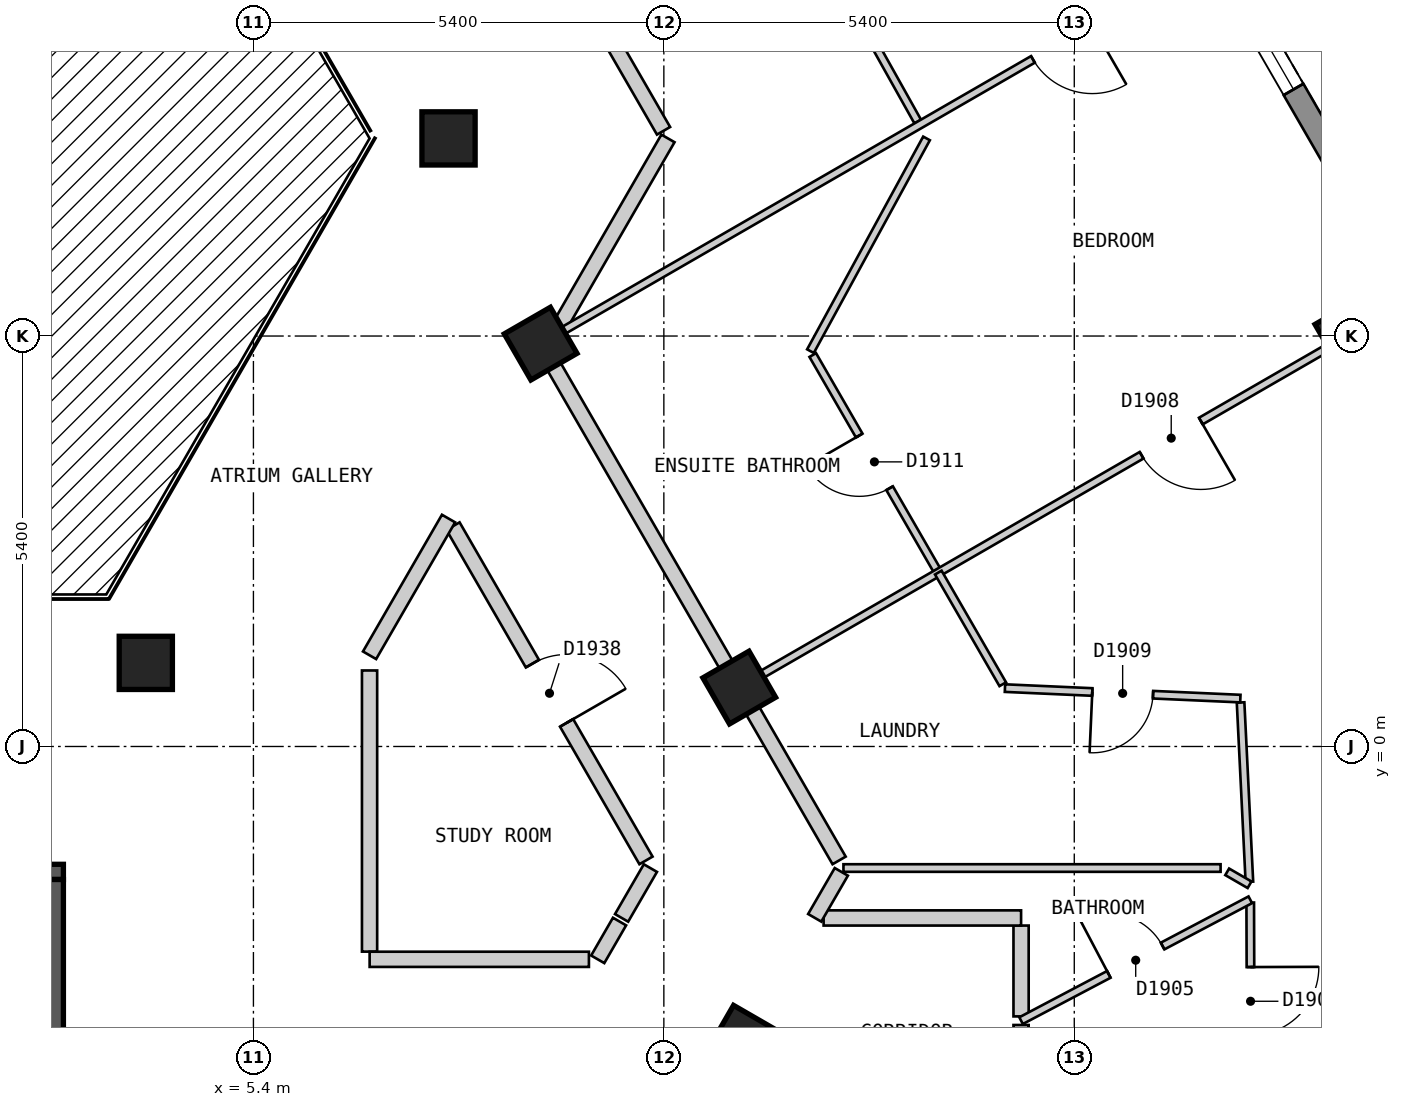
"""IFC4 building model, lengths in metres.
Left out: names, types, materials, properties, quantities, classifications, styles, units other than length and angle.
Written with IfcOpenShell. Run it as: python <this file> out.ifc"""

import sys

from ifc_helpers import new_model, si_unit, direction, frame, frame_2d, origin, origin_2d, place, context, subcontext, project, spatial, polyline, rectangle, outline, extrude, element, fill, save


model = new_model("IFC4")
c1 = context("Model", 3, precision=1e-05, world=origin(), true_north=direction((0.0, 1.0)))
c2 = subcontext(c1, "Body", "Model", "MODEL_VIEW")
j1 = project(units=[si_unit("LENGTHUNIT", "METRE"), si_unit("PLANEANGLEUNIT", "RADIAN")], contexts=[c1])
p1 = place(None, origin())
s1 = spatial("IfcSite", under=j1, at=p1, CompositionType="ELEMENT")
p2 = place(p1, origin())
s2 = spatial("IfcBuilding", under=s1, at=p2, CompositionType="ELEMENT")
p3 = place(p2, frame((0.0, 0.0, 226.8)))
s3 = spatial("IfcBuildingStorey", under=s2, at=p3, CompositionType="ELEMENT", Elevation=226.8)
for number, where, z_axis, x_axis in (
    (1, (19.846, 5.425, 0.0), (0.0, 0.0, 1.0), (-0.5, 0.866, 0.0)),
    (2, (11.845, -3.884, 0.0), (0.0, 0.0, 1.0), (0.5, 0.866, 0.0)),
    (3, (11.792, 0.775, 0.0), (0.0, 0.0, 1.0), (-0.5, 0.866, 0.0)),
    (4, (3.984, 1.1, 0.0), (0.0, 0.0, 1.0), (1.0, 0.0, 0.0)),
    (5, (9.179, 5.3, 0.0), (0.0, 0.0, 1.0), (-0.5, 0.866, 0.0)),
    (6, (7.967, 8.0, 0.0), (0.0, 0.0, 1.0), (1.0, 0.0, 0.0)),
):
    element("IfcColumn", number, at=place(p3, frame(where, z_axis=z_axis, x_axis=x_axis)), inside=s3, PredefinedType="COLUMN", context=c2, shape_type="SweptSolid", body=[
        extrude(rectangle(XDim=0.7, YDim=0.7, at=origin_2d()), origin(), (0.0, 0.0, 1.0), 3.0),
    ])
p4 = place(p3, frame((23.599, 0.825, 0.0), z_axis=(0.0, 0.0, 1.0), x_axis=(-0.500003656944, 0.866023292436, 0.0)))
e7 = element("IfcWall", 7, at=p4, inside=s3, PredefinedType="SOLIDWALL", context=c2, shape_type="SweptSolid", body=[
    extrude(outline(polyline([(0.0, -0.15), (22.17, -0.15), (22.09, 0.15), (0.08, 0.15), (0.0, -0.15)])), origin(), (0.0, 0.0, 1.0), 2.7),
])
p5 = place(p4, frame((1.191, 0.0, 0.15)))
e8 = element("IfcOpeningElement", 8, at=p5, cuts=e7, PredefinedType="OPENING", context=c2, shape_type="SweptSolid", body=[
    extrude(rectangle(XDim=1.5, YDim=2.1, at=frame_2d((0.75, 1.05))), frame((0.0, 0.16, 0.0), z_axis=(0.0, -1.0, 0.0), x_axis=(1.0, 0.0, 0.0)), (0.0, 0.0, 1.0), 0.32),
])
p6 = place(p4, frame((3.804, 0.0, 0.15)))
e9 = element("IfcOpeningElement", 9, at=p6, cuts=e7, PredefinedType="OPENING", context=c2, shape_type="SweptSolid", body=[
    extrude(rectangle(XDim=1.5, YDim=2.1, at=frame_2d((0.75, 1.05))), frame((0.0, 0.16, 0.0), z_axis=(0.0, -1.0, 0.0), x_axis=(1.0, 0.0, 0.0)), (0.0, 0.0, 1.0), 0.32),
])
p7 = place(p4, frame((6.417, 0.0, 0.15)))
e10 = element("IfcOpeningElement", 10, at=p7, cuts=e7, PredefinedType="OPENING", context=c2, shape_type="SweptSolid", body=[
    extrude(rectangle(XDim=1.5, YDim=2.1, at=frame_2d((0.75, 1.05))), frame((0.0, 0.16, 0.0), z_axis=(0.0, -1.0, 0.0), x_axis=(1.0, 0.0, 0.0)), (0.0, 0.0, 1.0), 0.32),
])
p8 = place(p4, frame((9.029, 0.0, 0.15)))
e11 = element("IfcOpeningElement", 11, at=p8, cuts=e7, PredefinedType="OPENING", context=c2, shape_type="SweptSolid", body=[
    extrude(rectangle(XDim=1.5, YDim=2.1, at=frame_2d((0.75, 1.05))), frame((0.0, 0.16, 0.0), z_axis=(0.0, -1.0, 0.0), x_axis=(1.0, 0.0, 0.0)), (0.0, 0.0, 1.0), 0.32),
])
p9 = place(p4, frame((11.641, 0.0, 0.15)))
e12 = element("IfcOpeningElement", 12, at=p9, cuts=e7, PredefinedType="OPENING", context=c2, shape_type="SweptSolid", body=[
    extrude(rectangle(XDim=1.5, YDim=2.1, at=frame_2d((0.75, 1.05))), frame((0.0, 0.16, 0.0), z_axis=(0.0, -1.0, 0.0), x_axis=(1.0, 0.0, 0.0)), (0.0, 0.0, 1.0), 0.32),
])
p10 = place(p4, frame((14.254, 0.0, 0.15)))
e13 = element("IfcOpeningElement", 13, at=p10, cuts=e7, PredefinedType="OPENING", context=c2, shape_type="SweptSolid", body=[
    extrude(rectangle(XDim=1.5, YDim=2.1, at=frame_2d((0.75, 1.05))), frame((0.0, 0.16, 0.0), z_axis=(0.0, -1.0, 0.0), x_axis=(1.0, 0.0, 0.0)), (0.0, 0.0, 1.0), 0.32),
])
p11 = place(p4, frame((16.866, 0.0, 0.15)))
e14 = element("IfcOpeningElement", 14, at=p11, cuts=e7, PredefinedType="OPENING", context=c2, shape_type="SweptSolid", body=[
    extrude(rectangle(XDim=1.5, YDim=2.1, at=frame_2d((0.75, 1.05))), frame((0.0, 0.16, 0.0), z_axis=(0.0, -1.0, 0.0), x_axis=(1.0, 0.0, 0.0)), (0.0, 0.0, 1.0), 0.32),
])
p12 = place(p4, frame((19.479, 0.0, 0.15)))
e15 = element("IfcOpeningElement", 15, at=p12, cuts=e7, PredefinedType="OPENING", context=c2, shape_type="SweptSolid", body=[
    extrude(rectangle(XDim=1.5, YDim=2.1, at=frame_2d((0.75, 1.05))), frame((0.0, 0.16, 0.0), z_axis=(0.0, -1.0, 0.0), x_axis=(1.0, 0.0, 0.0)), (0.0, 0.0, 1.0), 0.32),
])
p13 = place(p3, frame((-2.9, -1.65, 0.0), z_axis=(0.0, 0.0, 1.0), x_axis=(1.0, 0.0, 0.0)))
e16 = element("IfcWall", 16, at=p13, inside=s3, PredefinedType="SOLIDWALL", context=c2, shape_type="SweptSolid", body=[
    extrude(rectangle(XDim=5.8, YDim=0.2, at=frame_2d((2.9, 0.0))), origin(), (0.0, 0.0, 1.0), 2.7),
])
p14 = place(p13, frame((0.3, 0.0, 0.0)))
e17 = element("IfcOpeningElement", 17, at=p14, cuts=e16, PredefinedType="OPENING", context=c2, shape_type="SweptSolid", body=[
    extrude(rectangle(XDim=1.2, YDim=2.1, at=frame_2d((0.6, 1.05))), frame((0.0, 0.11, 0.0), z_axis=(0.0, -1.0, 0.0), x_axis=(1.0, 0.0, 0.0)), (0.0, 0.0, 1.0), 0.22),
])
p15 = place(p3, frame((2.8, -4.5, 0.0), z_axis=(0.0, 0.0, 1.0), x_axis=(0.0, 1.0, 0.0)))
e18 = element("IfcWall", 18, at=p15, inside=s3, PredefinedType="SOLIDWALL", context=c2, shape_type="SweptSolid", body=[
    extrude(rectangle(XDim=2.75, YDim=0.2, at=frame_2d((1.375, 0.0))), origin(), (0.0, 0.0, 1.0), 2.7),
])
p16 = place(p3, frame((8.026, 2.899, 0.0), z_axis=(0.0, 0.0, 1.0), x_axis=(0.499986018985, -0.866033475577, 0.0)))
e19 = element("IfcWall", 19, at=p16, inside=s3, PredefinedType="PARTITIONING", context=c2, shape_type="SweptSolid", body=[
    extrude(rectangle(XDim=5.078, YDim=0.2, at=frame_2d((2.539, 0.0))), origin(), (0.0, 0.0, 1.0), 2.7),
])
p17 = place(p16, frame((2.089, 0.0, 0.0)))
e20 = element("IfcOpeningElement", 20, at=p17, cuts=e19, PredefinedType="OPENING", context=c2, shape_type="SweptSolid", body=[
    extrude(rectangle(XDim=0.9, YDim=2.1, at=frame_2d((0.45, 1.05))), frame((0.0, 0.11, 0.0), z_axis=(0.0, -1.0, 0.0), x_axis=(1.0, 0.0, 0.0)), (0.0, 0.0, 1.0), 0.22),
])
p18 = place(p3, frame((9.238, 5.2, 0.0), z_axis=(0.0, 0.0, 1.0), x_axis=(0.500025705601, -0.86601056214, 0.0)))
e21 = element("IfcWall", 21, at=p18, inside=s3, PredefinedType="PARTITIONING", context=c2, shape_type="SweptSolid", body=[
    extrude(rectangle(XDim=7.735, YDim=0.2, at=frame_2d((3.868, 0.0))), origin(), (0.0, 0.0, 1.0), 2.7),
])
p19 = place(p3, frame((5.485, 17.3, 0.0), z_axis=(0.0, 0.0, 1.0), x_axis=(0.499943285704, -0.866058145322, 0.0)))
e22 = element("IfcWall", 22, at=p19, inside=s3, PredefinedType="PARTITIONING", context=c2, shape_type="SweptSolid", body=[
    extrude(rectangle(XDim=10.623, YDim=0.2, at=frame_2d((5.312, 0.0))), origin(), (0.0, 0.0, 1.0), 2.7),
])
p20 = place(p19, frame((3.901, 0.0, 0.0)))
e23 = element("IfcOpeningElement", 23, at=p20, cuts=e22, PredefinedType="OPENING", context=c2, shape_type="SweptSolid", body=[
    extrude(rectangle(XDim=1.0, YDim=2.1, at=frame_2d((0.5, 1.05))), frame((0.0, 0.11, 0.0), z_axis=(0.0, -1.0, 0.0), x_axis=(1.0, 0.0, 0.0)), (0.0, 0.0, 1.0), 0.22),
])
p21 = place(p3, frame((6.928, 1.0, 0.0), z_axis=(0.0, 0.0, 1.0), x_axis=(0.0, -1.0, 0.0)))
e24 = element("IfcWall", 24, at=p21, inside=s3, PredefinedType="PARTITIONING", context=c2, shape_type="SweptSolid", body=[
    extrude(rectangle(XDim=3.699, YDim=0.2, at=frame_2d((1.85, 0.0))), origin(), (0.0, 0.0, 1.0), 2.7),
])
p22 = place(p3, frame((15.5, -2.356, 0.0), z_axis=(0.0, 0.0, 1.0), x_axis=(0.0, -1.0, 0.0)))
e25 = element("IfcWall", 25, at=p22, inside=s3, PredefinedType="PARTITIONING", context=c2, shape_type="SweptSolid", body=[
    extrude(rectangle(XDim=1.195, YDim=0.2, at=frame_2d((0.598, 0.0))), origin(), (0.0, 0.0, 1.0), 2.7),
])
p23 = place(p3, frame((12.902, -2.256, 0.0), z_axis=(0.0, 0.0, 1.0), x_axis=(1.0, 0.0, 0.0)))
e26 = element("IfcWall", 26, at=p23, inside=s3, PredefinedType="PARTITIONING", context=c2, shape_type="SweptSolid", body=[
    extrude(rectangle(XDim=2.598, YDim=0.2, at=frame_2d((1.299, 0.0))), origin(), (0.0, 0.0, 1.0), 2.7),
])
p24 = place(p3, frame((6.929, -2.8, 0.0), z_axis=(0.0, 0.0, 1.0), x_axis=(1.0, 0.0, 0.0)))
e27 = element("IfcWall", 27, at=p24, inside=s3, PredefinedType="PARTITIONING", context=c2, shape_type="SweptSolid", body=[
    extrude(rectangle(XDim=2.885, YDim=0.2, at=frame_2d((1.442, 0.0))), origin(), (0.0, 0.0, 1.0), 2.7),
])
p25 = place(p3, frame((6.928, 1.2, 0.0), z_axis=(0.0, 0.0, 1.0), x_axis=(0.500132712588, 0.865948768577, 0.0)))
e28 = element("IfcWall", 28, at=p25, inside=s3, PredefinedType="PARTITIONING", context=c2, shape_type="SweptSolid", body=[
    extrude(rectangle(XDim=2.078, YDim=0.2, at=frame_2d((1.039, 0.0))), origin(), (0.0, 0.0, 1.0), 2.7),
])
p26 = place(p3, frame((9.404, 5.487, 0.0), z_axis=(0.0, 0.0, 1.0), x_axis=(0.499768590677, 0.866158966803, 0.0)))
e29 = element("IfcWall", 29, at=p26, inside=s3, PredefinedType="PARTITIONING", context=c2, shape_type="SweptSolid", body=[
    extrude(rectangle(XDim=2.901, YDim=0.2, at=frame_2d((1.451, 0.0))), origin(), (0.0, 0.0, 1.0), 2.7),
])
p27 = place(p3, frame((9.93, -2.8, 0.0), z_axis=(0.0, 0.0, 1.0), x_axis=(0.500164219654, 0.865930570761, 0.0)))
e30 = element("IfcWall", 30, at=p27, inside=s3, PredefinedType="PARTITIONING", context=c2, shape_type="SweptSolid", body=[
    extrude(rectangle(XDim=0.574, YDim=0.2, at=frame_2d((0.287, 0.0))), origin(), (0.0, 0.0, 1.0), 2.7),
])
p28 = place(p3, frame((10.244, -2.255, 0.0), z_axis=(0.0, 0.0, 1.0), x_axis=(0.50109986513, 0.865389464442, 0.0)))
e31 = element("IfcWall", 31, at=p28, inside=s3, PredefinedType="PARTITIONING", context=c2, shape_type="SweptSolid", body=[
    extrude(rectangle(XDim=0.757, YDim=0.2, at=frame_2d((0.378, 0.0))), origin(), (0.0, 0.0, 1.0), 2.7),
])
p29 = place(p3, frame((12.785, -2.254, 0.0), z_axis=(0.0, 0.0, 1.0), x_axis=(0.500871040665, 0.865521923826, 0.0)))
e32 = element("IfcWall", 32, at=p29, inside=s3, PredefinedType="PARTITIONING", context=c2, shape_type="SweptSolid", body=[
    extrude(rectangle(XDim=0.699, YDim=0.2, at=frame_2d((0.35, 0.0))), origin(), (0.0, 0.0, 1.0), 2.7),
])
p30 = place(p3, frame((15.5, -5.995, 0.0), z_axis=(0.0, 0.0, 1.0), x_axis=(0.0, 1.0, 0.0)))
e33 = element("IfcWall", 33, at=p30, inside=s3, PredefinedType="PARTITIONING", context=c2, shape_type="SweptSolid", body=[
    extrude(rectangle(XDim=2.331, YDim=0.2, at=frame_2d((1.166, 0.0))), origin(), (0.0, 0.0, 1.0), 2.7),
])
p31 = place(p30, frame((0.709, 0.0, 0.0)))
e34 = element("IfcOpeningElement", 34, at=p31, cuts=e33, PredefinedType="OPENING", context=c2, shape_type="SweptSolid", body=[
    extrude(rectangle(XDim=1.0, YDim=2.1, at=frame_2d((0.5, 1.05))), frame((0.0, 0.11, 0.0), z_axis=(0.0, -1.0, 0.0), x_axis=(1.0, 0.0, 0.0)), (0.0, 0.0, 1.0), 0.22),
])
p32 = place(p3, frame((12.759, 5.15, 0.0), z_axis=(0.0, 0.0, 1.0), x_axis=(0.499905801698, -0.866079782369, 0.0)))
e35 = element("IfcWall", 35, at=p32, inside=s3, PredefinedType="PARTITIONING", context=c2, shape_type="SweptSolid", body=[
    extrude(rectangle(XDim=3.304, YDim=0.1, at=frame_2d((1.652, 0.0))), origin(), (0.0, 0.0, 1.0), 2.7),
])
p33 = place(p32, frame((1.223, 0.0, 0.0)))
e36 = element("IfcOpeningElement", 36, at=p33, cuts=e35, PredefinedType="OPENING", context=c2, shape_type="SweptSolid", body=[
    extrude(rectangle(XDim=0.8, YDim=2.1, at=frame_2d((0.4, 1.05))), frame((0.0, 0.06, 0.0), z_axis=(0.0, -1.0, 0.0), x_axis=(1.0, 0.0, 0.0)), (0.0, 0.0, 1.0), 0.12),
])
p34 = place(p3, frame((11.66, 12.65, 0.0), z_axis=(0.0, 0.0, 1.0), x_axis=(0.488650242737, -0.872479764965, 0.0)))
e37 = element("IfcWall", 37, at=p34, inside=s3, PredefinedType="PARTITIONING", context=c2, shape_type="SweptSolid", body=[
    extrude(rectangle(XDim=5.075, YDim=0.1, at=frame_2d((2.538, 0.0))), origin(), (0.0, 0.0, 1.0), 2.7),
])
p35 = place(p34, frame((2.113, 0.0, 0.0)))
e38 = element("IfcOpeningElement", 38, at=p35, cuts=e37, PredefinedType="OPENING", context=c2, shape_type="SweptSolid", body=[
    extrude(rectangle(XDim=0.8, YDim=2.1, at=frame_2d((0.4, 1.05))), frame((0.0, 0.06, 0.0), z_axis=(0.0, -1.0, 0.0), x_axis=(1.0, 0.0, 0.0)), (0.0, 0.0, 1.0), 0.12),
])
p36 = place(p3, frame((18.388, 0.579, 0.0), z_axis=(0.0, 0.0, 1.0), x_axis=(0.049097293833, -0.998794000652, 0.0)))
e39 = element("IfcWall", 39, at=p36, inside=s3, PredefinedType="PARTITIONING", context=c2, shape_type="SweptSolid", body=[
    extrude(rectangle(XDim=2.362, YDim=0.1, at=frame_2d((1.181, 0.0))), origin(), (0.0, 0.0, 1.0), 2.7),
])
p37 = place(p3, frame((18.515, -2.053, 0.0), z_axis=(0.0, 0.0, 1.0), x_axis=(0.003338710651, -0.99999442649, 0.0)))
e40 = element("IfcWall", 40, at=p37, inside=s3, PredefinedType="PARTITIONING", context=c2, shape_type="SweptSolid", body=[
    extrude(rectangle(XDim=2.413, YDim=0.1, at=frame_2d((1.207, 0.0))), origin(), (0.0, 0.0, 1.0), 2.7),
])
p38 = place(p37, frame((0.849, 0.0, 0.0)))
e41 = element("IfcOpeningElement", 41, at=p38, cuts=e40, PredefinedType="OPENING", context=c2, shape_type="SweptSolid", body=[
    extrude(rectangle(XDim=0.9, YDim=2.1, at=frame_2d((0.45, 1.05))), frame((0.0, 0.06, 0.0), z_axis=(0.0, -1.0, 0.0), x_axis=(1.0, 0.0, 0.0)), (0.0, 0.0, 1.0), 0.12),
])
p39 = place(p3, frame((15.288, 0.768, 0.0), z_axis=(0.0, 0.0, 1.0), x_axis=(0.999006028269, -0.044575278833, 0.0)))
e42 = element("IfcWall", 42, at=p39, inside=s3, PredefinedType="PARTITIONING", context=c2, shape_type="SweptSolid", body=[
    extrude(rectangle(XDim=3.1, YDim=0.1, at=frame_2d((1.55, 0.0))), origin(), (0.0, 0.0, 1.0), 2.7),
])
p40 = place(p39, frame((1.15, 0.0, 0.0)))
e43 = element("IfcOpeningElement", 43, at=p40, cuts=e42, PredefinedType="OPENING", context=c2, shape_type="SweptSolid", body=[
    extrude(rectangle(XDim=0.8, YDim=2.1, at=frame_2d((0.4, 1.05))), frame((0.0, 0.06, 0.0), z_axis=(0.0, -1.0, 0.0), x_axis=(1.0, 0.0, 0.0)), (0.0, 0.0, 1.0), 0.12),
])
p41 = place(p3, frame((18.212, -1.649, 0.0), z_axis=(0.0, 0.0, 1.0), x_axis=(0.865622947871, -0.500696427109, 0.0)))
e44 = element("IfcWall", 44, at=p41, inside=s3, PredefinedType="PARTITIONING", context=c2, shape_type="SweptSolid", body=[
    extrude(rectangle(XDim=0.34, YDim=0.1, at=frame_2d((0.17, 0.0))), origin(), (0.0, 0.0, 1.0), 2.7),
])
p42 = place(p3, frame((13.163, -1.599, 0.0), z_axis=(0.0, 0.0, 1.0), x_axis=(1.0, 0.0, 0.0)))
e45 = element("IfcWall", 45, at=p42, inside=s3, PredefinedType="PARTITIONING", context=c2, shape_type="SweptSolid", body=[
    extrude(rectangle(XDim=4.962, YDim=0.1, at=frame_2d((2.481, 0.0))), origin(), (0.0, 0.0, 1.0), 2.7),
])
p43 = place(p3, frame((12.729, 5.201, 0.0), z_axis=(0.0, 0.0, 1.0), x_axis=(0.478932598182, 0.877851676764, 0.0)))
e46 = element("IfcWall", 46, at=p43, inside=s3, PredefinedType="PARTITIONING", context=c2, shape_type="SweptSolid", body=[
    extrude(rectangle(XDim=3.188, YDim=0.1, at=frame_2d((1.594, 0.0))), origin(), (0.0, 0.0, 1.0), 2.7),
])
p44 = place(p3, frame((15.5, -3.607, 0.0), z_axis=(0.0, 0.0, 1.0), x_axis=(0.884626030835, 0.466301174745, 0.0)))
e47 = element("IfcWall", 47, at=p44, inside=s3, PredefinedType="PARTITIONING", context=c2, shape_type="SweptSolid", body=[
    extrude(rectangle(XDim=3.409, YDim=0.1, at=frame_2d((1.705, 0.0))), origin(), (0.0, 0.0, 1.0), 2.7),
])
p45 = place(p44, frame((1.305, 0.0, 0.0)))
e48 = element("IfcOpeningElement", 48, at=p45, cuts=e47, PredefinedType="OPENING", context=c2, shape_type="SweptSolid", body=[
    extrude(rectangle(XDim=0.8, YDim=2.1, at=frame_2d((0.4, 1.05))), frame((0.0, 0.06, 0.0), z_axis=(0.0, -1.0, 0.0), x_axis=(1.0, 0.0, 0.0)), (0.0, 0.0, 1.0), 0.12),
])
p46 = place(p3, frame((11.879, 0.826, 0.0), z_axis=(0.0, 0.0, 1.0), x_axis=(0.866065245018, 0.499930986609, 0.0)))
e49 = element("IfcWall", 49, at=p46, inside=s3, PredefinedType="PARTITIONING", context=c2, shape_type="SweptSolid", body=[
    extrude(rectangle(XDim=10.0, YDim=0.1, at=frame_2d((5.0, 0.0))), origin(), (0.0, 0.0, 1.0), 2.7),
])
p47 = place(p46, frame((6.012, 0.0, 0.0)))
e50 = element("IfcOpeningElement", 50, at=p47, cuts=e49, PredefinedType="OPENING", context=c2, shape_type="SweptSolid", body=[
    extrude(rectangle(XDim=0.9, YDim=2.1, at=frame_2d((0.45, 1.05))), frame((0.0, 0.06, 0.0), z_axis=(0.0, -1.0, 0.0), x_axis=(1.0, 0.0, 0.0)), (0.0, 0.0, 1.0), 0.12),
])
p48 = place(p3, frame((9.354, 5.401, 0.0), z_axis=(0.0, 0.0, 1.0), x_axis=(0.866018411306, 0.500012111133, 0.0)))
e51 = element("IfcWall", 51, at=p48, inside=s3, PredefinedType="PARTITIONING", context=c2, shape_type="SweptSolid", body=[
    extrude(rectangle(XDim=9.898, YDim=0.1, at=frame_2d((4.949, 0.0))), origin(), (0.0, 0.0, 1.0), 2.7),
])
p49 = place(p48, frame((7.277, 0.0, 0.0)))
e52 = element("IfcOpeningElement", 52, at=p49, cuts=e51, PredefinedType="OPENING", context=c2, shape_type="SweptSolid", body=[
    extrude(rectangle(XDim=0.9, YDim=2.1, at=frame_2d((0.45, 1.05))), frame((0.0, 0.06, 0.0), z_axis=(0.0, -1.0, 0.0), x_axis=(1.0, 0.0, 0.0)), (0.0, 0.0, 1.0), 0.12),
])
p50 = place(p3, frame((14.411, 2.288, 0.0), z_axis=(0.0, 0.0, 1.0), x_axis=(0.500009005995, -0.866020204108, 0.0)))
e53 = element("IfcWall", 53, at=p50, inside=s3, PredefinedType="PARTITIONING", context=c2, shape_type="SweptSolid", body=[
    extrude(rectangle(XDim=1.696, YDim=0.1, at=frame_2d((0.848, 0.0))), origin(), (0.0, 0.0, 1.0), 2.7),
])
p51 = place(p8, origin())
e54 = element("IfcWindow", 54, at=p51, inside=s3, PartitioningType="SINGLE_PANEL", PredefinedType="WINDOW", context=c2, shape_type="SweptSolid", body=[
    extrude(rectangle(XDim=1.5, YDim=2.1, at=frame_2d((0.75, 1.05))), frame((0.0, 0.03, 0.0), z_axis=(0.0, -1.0, 0.0), x_axis=(1.0, 0.0, 0.0)), (0.0, 0.0, 1.0), 0.06),
])
fill(e11, e54)
p52 = place(p45, origin())
e55 = element("IfcDoor", 55, at=p52, inside=s3, OperationType="SINGLE_SWING_LEFT", PredefinedType="DOOR", context=c2, shape_type="SweptSolid", body=[
    extrude(rectangle(XDim=0.8, YDim=2.1, at=frame_2d((0.4, 1.05))), frame((0.0, 0.025, 0.0), z_axis=(0.0, -1.0, 0.0), x_axis=(1.0, 0.0, 0.0)), (0.0, 0.0, 1.0), 0.05),
])
fill(e48, e55)
p53 = place(p38, origin())
e56 = element("IfcDoor", 56, at=p53, inside=s3, OperationType="SINGLE_SWING_LEFT", PredefinedType="DOOR", context=c2, shape_type="SweptSolid", body=[
    extrude(rectangle(XDim=0.9, YDim=2.1, at=frame_2d((0.45, 1.05))), frame((0.0, 0.025, 0.0), z_axis=(0.0, -1.0, 0.0), x_axis=(1.0, 0.0, 0.0)), (0.0, 0.0, 1.0), 0.05),
])
fill(e41, e56)
p54 = place(p47, origin())
e57 = element("IfcDoor", 57, at=p54, inside=s3, OperationType="SINGLE_SWING_RIGHT", PredefinedType="DOOR", context=c2, shape_type="SweptSolid", body=[
    extrude(rectangle(XDim=0.9, YDim=2.1, at=frame_2d((0.45, 1.05))), frame((0.0, 0.025, 0.0), z_axis=(0.0, -1.0, 0.0), x_axis=(1.0, 0.0, 0.0)), (0.0, 0.0, 1.0), 0.05),
])
fill(e50, e57)
p55 = place(p40, origin())
e58 = element("IfcDoor", 58, at=p55, inside=s3, OperationType="SINGLE_SWING_LEFT", PredefinedType="DOOR", context=c2, shape_type="SweptSolid", body=[
    extrude(rectangle(XDim=0.8, YDim=2.1, at=frame_2d((0.4, 1.05))), frame((0.0, 0.025, 0.0), z_axis=(0.0, -1.0, 0.0), x_axis=(1.0, 0.0, 0.0)), (0.0, 0.0, 1.0), 0.05),
])
fill(e43, e58)
p56 = place(p49, origin())
e59 = element("IfcDoor", 59, at=p56, inside=s3, OperationType="SINGLE_SWING_RIGHT", PredefinedType="DOOR", context=c2, shape_type="SweptSolid", body=[
    extrude(rectangle(XDim=0.9, YDim=2.1, at=frame_2d((0.45, 1.05))), frame((0.0, 0.025, 0.0), z_axis=(0.0, -1.0, 0.0), x_axis=(1.0, 0.0, 0.0)), (0.0, 0.0, 1.0), 0.05),
])
fill(e52, e59)
p57 = place(p33, origin())
e60 = element("IfcDoor", 60, at=p57, inside=s3, OperationType="SINGLE_SWING_LEFT", PredefinedType="DOOR", context=c2, shape_type="SweptSolid", body=[
    extrude(rectangle(XDim=0.8, YDim=2.1, at=frame_2d((0.4, 1.05))), frame((0.0, 0.025, 0.0), z_axis=(0.0, -1.0, 0.0), x_axis=(1.0, 0.0, 0.0)), (0.0, 0.0, 1.0), 0.05),
])
fill(e36, e60)
p58 = place(p17, origin())
e61 = element("IfcDoor", 61, at=p58, inside=s3, OperationType="SINGLE_SWING_RIGHT", PredefinedType="DOOR", context=c2, shape_type="SweptSolid", body=[
    extrude(rectangle(XDim=0.9, YDim=2.1, at=frame_2d((0.45, 1.05))), frame((0.0, 0.025, 0.0), z_axis=(0.0, -1.0, 0.0), x_axis=(1.0, 0.0, 0.0)), (0.0, 0.0, 1.0), 0.05),
])
fill(e20, e61)
save(model, sys.argv[1])
